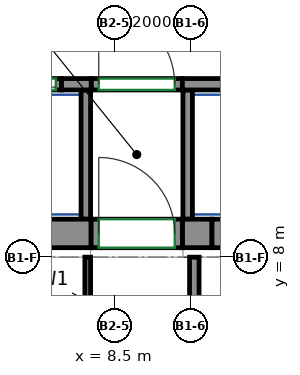
"""IFC4 building model, lengths in metres.
Left out: names, types, materials, properties, quantities, classifications, styles, units other than length and angle.
Written with IfcOpenShell. Run it as: python <this file> out.ifc"""

import sys

from ifc_helpers import new_model, si_unit, direction, frame, frame_2d, origin, place, context, subcontext, project, spatial, rectangle, extrude, source, transform, mapped, element, fill, save


model = new_model("IFC4")
c1 = context("Model", 3, precision=1e-05, world=origin(), true_north=direction((0.0, 1.0)))
c2 = subcontext(c1, "Body", "Model", "MODEL_VIEW")
j1 = project(units=[si_unit("LENGTHUNIT", "METRE"), si_unit("PLANEANGLEUNIT", "RADIAN")], contexts=[c1])
p1 = place(None, origin())
s1 = spatial("IfcSite", under=j1, at=p1, CompositionType="ELEMENT")
p2 = place(p1, origin())
s2 = spatial("IfcBuilding", under=s1, at=p2, CompositionType="ELEMENT")
p3 = place(p2, frame((0.0, 0.0, 182.1)))
s3 = spatial("IfcBuildingStorey", under=s2, at=p3, CompositionType="ELEMENT", Elevation=182.1)
m1 = source(origin(), c2, "Body", "SweptSolid", [
    extrude(rectangle(XDim=14.18, YDim=0.75, at=frame_2d((7.09, 0.0))), origin(), (0.0, 0.0, 1.0), 3.12),
])
p4 = place(p3, frame((-6.29, 8.625, 0.0), z_axis=(0.0, 0.0, 1.0), x_axis=(1.0, 0.0, 0.0)))
e1 = element("IfcWall", 1, at=p4, inside=s3, PredefinedType="SHEAR", context=c2, shape_type="MappedRepresentation", body=[
    mapped(m1, transform((0.0, 0.0, 0.0))),
])
m2 = source(origin(), c2, "Body", "SweptSolid", [
    extrude(rectangle(XDim=0.78, YDim=0.75, at=frame_2d((0.39, 0.0))), origin(), (0.0, 0.0, 1.0), 3.12),
])
p5 = place(p3, frame((10.29, 8.625, 0.0), z_axis=(0.0, 0.0, 1.0), x_axis=(1.0, 0.0, 0.0)))
e2 = element("IfcWall", 2, at=p5, inside=s3, PredefinedType="SHEAR", context=c2, shape_type="MappedRepresentation", body=[
    mapped(m2, transform((0.0, 0.0, 0.0))),
])
m3 = source(origin(), c2, "Body", "SweptSolid", [
    extrude(rectangle(XDim=0.78, YDim=0.3, at=frame_2d((0.39, 0.0))), origin(), (0.0, 0.0, 1.0), 3.12),
])
p6 = place(p3, frame((7.11, 12.55, 0.0), z_axis=(0.0, 0.0, 1.0), x_axis=(1.0, 0.0, 0.0)))
e3 = element("IfcWall", 3, at=p6, inside=s3, PredefinedType="SHEAR", context=c2, shape_type="MappedRepresentation", body=[
    mapped(m3, transform((0.0, 0.0, 0.0))),
])
m4 = source(origin(), c2, "Body", "SweptSolid", [
    extrude(rectangle(XDim=2.82, YDim=0.3, at=frame_2d((1.41, 0.0))), origin(), (0.0, 0.0, 1.0), 3.12),
])
p7 = place(p3, frame((10.29, 12.55, 0.0), z_axis=(0.0, 0.0, 1.0), x_axis=(1.0, 0.0, 0.0)))
e4 = element("IfcWall", 4, at=p7, inside=s3, PredefinedType="SHEAR", context=c2, shape_type="MappedRepresentation", body=[
    mapped(m4, transform((0.0, 0.0, 0.0))),
])
m5 = source(origin(), c2, "Body", "SweptSolid", [
    extrude(rectangle(XDim=1.4, YDim=0.3, at=frame_2d((0.7, 0.0))), origin(), (0.0, 0.0, 1.0), 3.12),
])
p8 = place(p3, frame((5.71, 12.55, 0.0), z_axis=(0.0, 0.0, 1.0), x_axis=(1.0, 0.0, 0.0)))
e5 = element("IfcWall", 5, at=p8, inside=s3, PredefinedType="PARTITIONING", context=c2, shape_type="MappedRepresentation", body=[
    mapped(m5, transform((0.0, 0.0, 0.0))),
])
p9 = place(p8, frame((0.15, 0.0, 0.0)))
e6 = element("IfcOpeningElement", 6, at=p9, cuts=e5, PredefinedType="OPENING", context=c2, shape_type="SweptSolid", body=[
    extrude(rectangle(XDim=1.1, YDim=2.1, at=frame_2d((0.55, 1.05))), frame((0.0, 0.16, 0.0), z_axis=(0.0, -1.0, 0.0), x_axis=(1.0, 0.0, 0.0)), (0.0, 0.0, 1.0), 0.32),
])
m6 = source(origin(), c2, "Body", "SweptSolid", [
    extrude(rectangle(XDim=2.4, YDim=0.3, at=frame_2d((1.2, 0.0))), origin(), (0.0, 0.0, 1.0), 3.12),
])
p10 = place(p3, frame((7.89, 12.55, 0.0), z_axis=(0.0, 0.0, 1.0), x_axis=(1.0, 0.0, 0.0)))
e7 = element("IfcWall", 7, at=p10, inside=s3, PredefinedType="PARTITIONING", context=c2, shape_type="MappedRepresentation", body=[
    mapped(m6, transform((0.0, 0.0, 0.0))),
])
p11 = place(p10, frame((0.2, 0.0, 0.0)))
e8 = element("IfcOpeningElement", 8, at=p11, cuts=e7, PredefinedType="OPENING", context=c2, shape_type="SweptSolid", body=[
    extrude(rectangle(XDim=2.0, YDim=2.1, at=frame_2d((1.0, 1.05))), frame((0.0, 0.16, 0.0), z_axis=(0.0, -1.0, 0.0), x_axis=(1.0, 0.0, 0.0)), (0.0, 0.0, 1.0), 0.32),
])
m7 = source(origin(), c2, "Body", "SweptSolid", [
    extrude(rectangle(XDim=2.65, YDim=0.25, at=frame_2d((1.325, 0.0))), origin(), (0.0, 0.0, 1.0), 3.12),
])
p12 = place(p3, frame((10.605, 5.35, 0.0), z_axis=(0.0, 0.0, 1.0), x_axis=(0.0, 1.0, 0.0)))
e9 = element("IfcWall", 9, at=p12, inside=s3, PredefinedType="PARTITIONING", context=c2, shape_type="MappedRepresentation", body=[
    mapped(m7, transform((0.0, 0.0, 0.0))),
])
m8 = source(origin(), c2, "Body", "SweptSolid", [
    extrude(rectangle(XDim=3.4, YDim=0.25, at=frame_2d((1.7, 0.0))), origin(), (0.0, 0.0, 1.0), 3.12),
])
for number, where, z_axis, x_axis in (
    (10, (10.43, 9.0, 0.0), (0.0, 0.0, 1.0), (0.0, 1.0, 0.0)),
    (11, (7.75, 9.0, 0.0), (0.0, 0.0, 1.0), (0.0, 1.0, 0.0)),
):
    element("IfcWall", number, at=place(p3, frame(where, z_axis=z_axis, x_axis=x_axis)), inside=s3, PredefinedType="PARTITIONING", context=c2, shape_type="MappedRepresentation", body=[
        mapped(m8, transform((0.0, 0.0, 0.0))),
    ])
m9 = source(origin(), c2, "Body", "SweptSolid", [
    extrude(rectangle(XDim=2.4, YDim=0.75, at=frame_2d((1.2, 0.0))), origin(), (0.0, 0.0, 1.0), 2.7),
])
p13 = place(p3, frame((7.89, 8.625, 0.0), z_axis=(0.0, 0.0, 1.0), x_axis=(1.0, 0.0, 0.0)))
e12 = element("IfcWall", 12, at=p13, inside=s3, PredefinedType="PARTITIONING", context=c2, shape_type="MappedRepresentation", body=[
    mapped(m9, transform((0.0, 0.0, 0.0))),
])
p14 = place(p13, frame((0.2, 0.0, 0.0)))
e13 = element("IfcOpeningElement", 13, at=p14, cuts=e12, PredefinedType="OPENING", context=c2, shape_type="SweptSolid", body=[
    extrude(rectangle(XDim=2.0, YDim=2.1, at=frame_2d((1.0, 1.05))), frame((0.0, 0.385, 0.0), z_axis=(0.0, -1.0, 0.0), x_axis=(1.0, 0.0, 0.0)), (0.0, 0.0, 1.0), 0.77),
])
m10 = source(origin(), c2, "Body", "SweptSolid", [
    extrude(rectangle(XDim=1.4, YDim=0.75, at=frame_2d((0.7, 0.0))), origin(), (0.0, 0.0, 1.0), 2.7),
])
p15 = place(p3, frame((11.07, 8.625, 0.0), z_axis=(0.0, 0.0, 1.0), x_axis=(1.0, 0.0, 0.0)))
e14 = element("IfcWall", 14, at=p15, inside=s3, PredefinedType="PARTITIONING", context=c2, shape_type="MappedRepresentation", body=[
    mapped(m10, transform((0.0, 0.0, 0.0))),
])
p16 = place(p15, frame((0.25, 0.0, 0.0)))
e15 = element("IfcOpeningElement", 15, at=p16, cuts=e14, PredefinedType="OPENING", context=c2, shape_type="SweptSolid", body=[
    extrude(rectangle(XDim=0.9, YDim=2.1, at=frame_2d((0.45, 1.05))), frame((0.0, 0.385, 0.0), z_axis=(0.0, -1.0, 0.0), x_axis=(1.0, 0.0, 0.0)), (0.0, 0.0, 1.0), 0.77),
])
p17 = place(p3, frame((7.8, 8.0, 0.0), z_axis=(0.0, 0.0, 1.0), x_axis=(0.0, -1.0, 0.0)))
e16 = element("IfcWall", 16, at=p17, inside=s3, PredefinedType="PARTITIONING", context=c2, shape_type="SweptSolid", body=[
    extrude(rectangle(XDim=2.325, YDim=0.15, at=frame_2d((1.163, 0.0))), origin(), (0.0, 0.0, 1.0), 3.12),
])
p18 = place(p11, origin())
e17 = element("IfcDoor", 17, at=p18, inside=s3, OperationType="DOUBLE_DOOR_SINGLE_SWING", PredefinedType="DOOR", context=c2, shape_type="SweptSolid", body=[
    extrude(rectangle(XDim=2.0, YDim=2.1, at=frame_2d((1.0, 1.05))), frame((0.0, 0.025, 0.0), z_axis=(0.0, -1.0, 0.0), x_axis=(1.0, 0.0, 0.0)), (0.0, 0.0, 1.0), 0.05),
])
fill(e8, e17)
p19 = place(p14, origin())
e18 = element("IfcDoor", 18, at=p19, inside=s3, OperationType="DOUBLE_DOOR_SINGLE_SWING", PredefinedType="DOOR", context=c2, shape_type="SweptSolid", body=[
    extrude(rectangle(XDim=2.0, YDim=2.1, at=frame_2d((1.0, 1.05))), frame((0.0, 0.28, 0.0), z_axis=(0.0, -1.0, 0.0), x_axis=(1.0, 0.0, 0.0)), (0.0, 0.0, 1.0), 0.05),
])
fill(e13, e18)
p20 = place(p9, origin())
e19 = element("IfcDoor", 19, at=p20, inside=s3, OperationType="DOUBLE_DOOR_SLIDING", PredefinedType="DOOR", context=c2, shape_type="SweptSolid", body=[
    extrude(rectangle(XDim=1.1, YDim=2.1, at=frame_2d((0.55, 1.05))), frame((0.0, 0.025, 0.0), z_axis=(0.0, -1.0, 0.0), x_axis=(1.0, 0.0, 0.0)), (0.0, 0.0, 1.0), 0.05),
])
fill(e6, e19)
save(model, sys.argv[1])
